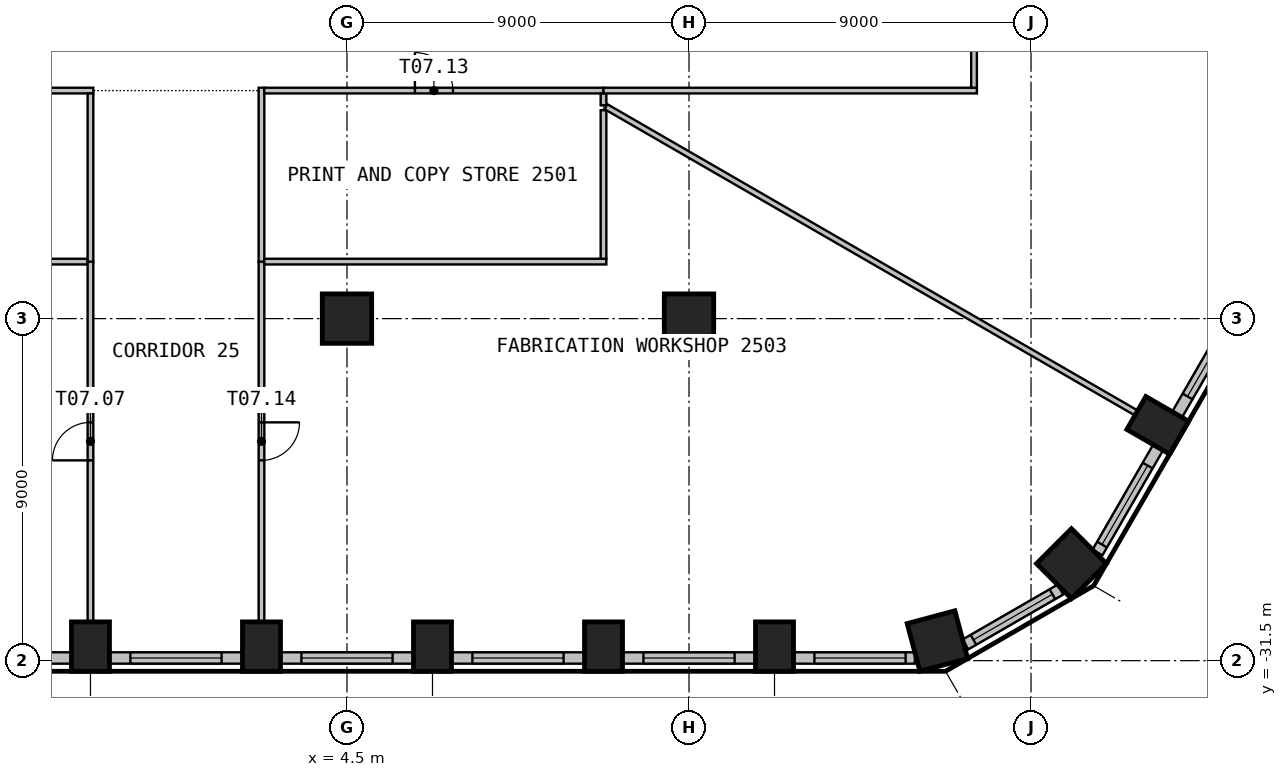
"""IFC4 building model, lengths in metres.
Left out: names, types, materials, properties, quantities, classifications, styles, units other than length and angle.
Written with IfcOpenShell. Run it as: python <this file> out.ifc"""

import sys

from ifc_helpers import new_model, si_unit, direction, frame, frame_2d, origin, origin_2d, place, context, subcontext, project, spatial, rectangle, circle, extrude, element, fill, save


model = new_model("IFC4")
c1 = context("Model", 3, precision=1e-05, world=origin(), true_north=direction((0.0, 1.0)))
c2 = subcontext(c1, "Body", "Model", "MODEL_VIEW")
j1 = project(units=[si_unit("LENGTHUNIT", "METRE"), si_unit("PLANEANGLEUNIT", "RADIAN")], contexts=[c1])
p1 = place(None, origin())
s1 = spatial("IfcSite", under=j1, at=p1, CompositionType="ELEMENT")
p2 = place(p1, origin())
s2 = spatial("IfcBuilding", under=s1, at=p2, CompositionType="ELEMENT")
p3 = place(p2, frame((0.0, 0.0, 104.7)))
s3 = spatial("IfcBuildingStorey", under=s2, at=p3, CompositionType="ELEMENT", Elevation=104.7)
for number, where, z_axis, x_axis in (
    (1, (-2.25, -31.13, 0.0), (0.0, 0.0, 1.0), (1.0, 0.0, 0.0)),
    (2, (2.25, -31.13, 0.0), (0.0, 0.0, 1.0), (1.0, 0.0, 0.0)),
    (3, (6.75, -31.13, 0.0), (0.0, 0.0, 1.0), (1.0, 0.0, 0.0)),
    (4, (11.25, -31.13, 0.0), (0.0, 0.0, 1.0), (1.0, 0.0, 0.0)),
    (5, (15.75, -31.13, 0.0), (0.0, 0.0, 1.0), (1.0, 0.0, 0.0)),
):
    element("IfcColumn", number, at=place(p3, frame(where, z_axis=z_axis, x_axis=x_axis)), inside=s3, PredefinedType="COLUMN", context=c2, shape_type="SweptSolid", body=[
        extrude(rectangle(XDim=1.0, YDim=1.3, at=origin_2d()), origin(), (0.0, 0.0, 1.0), 3.525),
    ])
for number, where, z_axis, x_axis in (
    (6, (20.037, -30.984, 0.0), (0.0, 0.0, 1.0), (0.966, 0.259, 0.0)),
    (7, (23.564, -28.947, 0.0), (0.0, 0.0, 1.0), (0.707, 0.707, 0.0)),
):
    element("IfcColumn", number, at=place(p3, frame(where, z_axis=z_axis, x_axis=x_axis)), inside=s3, PredefinedType="COLUMN", context=c2, shape_type="SweptSolid", body=[
        extrude(rectangle(XDim=1.3, YDim=1.3, at=origin_2d()), origin(), (0.0, 0.0, 1.0), 3.525),
    ])
p4 = place(p3, frame((25.834, -25.308, 0.0), z_axis=(0.0, 0.0, 1.0), x_axis=(0.5, 0.866025403784, 0.0)))
e8 = element("IfcColumn", 8, at=p4, inside=s3, PredefinedType="COLUMN", context=c2, shape_type="SweptSolid", body=[
    extrude(rectangle(XDim=1.0, YDim=1.3, at=origin_2d()), origin(), (0.0, 0.0, 1.0), 3.525),
])
for number, where, z_axis, x_axis in (
    (9, (4.5, -22.5, 0.0), (0.0, 0.0, 1.0), (1.0, 0.0, 0.0)),
    (10, (13.5, -22.5, 0.0), (0.0, 0.0, 1.0), (1.0, 0.0, 0.0)),
):
    element("IfcColumn", number, at=place(p3, frame(where, z_axis=z_axis, x_axis=x_axis)), inside=s3, PredefinedType="COLUMN", context=c2, shape_type="SweptSolid", body=[
        extrude(circle(Radius=0.65, at=origin_2d()), origin(), (0.0, 0.0, 1.0), 3.525),
    ])
p5 = place(p3, frame((-6.25, -31.43, 0.0), z_axis=(0.0, 0.0, 1.0), x_axis=(1.0, 0.0, 0.0)))
e11 = element("IfcWall", 11, at=p5, inside=s3, PredefinedType="SOLIDWALL", context=c2, shape_type="SweptSolid", body=[
    extrude(rectangle(XDim=3.499, YDim=0.3, at=frame_2d((1.75, 0.0))), origin(), (0.0, 0.0, 1.0), 3.525),
])
p6 = place(p5, frame((0.55, 0.0, 0.9)))
e12 = element("IfcOpeningElement", 12, at=p6, cuts=e11, PredefinedType="OPENING", context=c2, shape_type="SweptSolid", body=[
    extrude(rectangle(XDim=2.4, YDim=2.1, at=frame_2d((1.2, 1.05))), frame((0.0, 0.16, 0.0), z_axis=(0.0, -1.0, 0.0), x_axis=(1.0, 0.0, 0.0)), (0.0, 0.0, 1.0), 0.32),
])
p7 = place(p3, frame((-1.75, -31.43, 0.0), z_axis=(0.0, 0.0, 1.0), x_axis=(1.0, 0.0, 0.0)))
e13 = element("IfcWall", 13, at=p7, inside=s3, PredefinedType="SOLIDWALL", context=c2, shape_type="SweptSolid", body=[
    extrude(rectangle(XDim=3.499, YDim=0.3, at=frame_2d((1.75, 0.0))), origin(), (0.0, 0.0, 1.0), 3.525),
])
p8 = place(p7, frame((0.55, 0.0, 0.9)))
e14 = element("IfcOpeningElement", 14, at=p8, cuts=e13, PredefinedType="OPENING", context=c2, shape_type="SweptSolid", body=[
    extrude(rectangle(XDim=2.4, YDim=2.1, at=frame_2d((1.2, 1.05))), frame((0.0, 0.16, 0.0), z_axis=(0.0, -1.0, 0.0), x_axis=(1.0, 0.0, 0.0)), (0.0, 0.0, 1.0), 0.32),
])
p9 = place(p3, frame((2.75, -31.43, 0.0), z_axis=(0.0, 0.0, 1.0), x_axis=(1.0, 0.0, 0.0)))
e15 = element("IfcWall", 15, at=p9, inside=s3, PredefinedType="SOLIDWALL", context=c2, shape_type="SweptSolid", body=[
    extrude(rectangle(XDim=3.499, YDim=0.3, at=frame_2d((1.75, 0.0))), origin(), (0.0, 0.0, 1.0), 3.525),
])
p10 = place(p9, frame((0.55, 0.0, 0.9)))
e16 = element("IfcOpeningElement", 16, at=p10, cuts=e15, PredefinedType="OPENING", context=c2, shape_type="SweptSolid", body=[
    extrude(rectangle(XDim=2.4, YDim=2.1, at=frame_2d((1.2, 1.05))), frame((0.0, 0.16, 0.0), z_axis=(0.0, -1.0, 0.0), x_axis=(1.0, 0.0, 0.0)), (0.0, 0.0, 1.0), 0.32),
])
p11 = place(p3, frame((7.25, -31.43, 0.0), z_axis=(0.0, 0.0, 1.0), x_axis=(1.0, 0.0, 0.0)))
e17 = element("IfcWall", 17, at=p11, inside=s3, PredefinedType="SOLIDWALL", context=c2, shape_type="SweptSolid", body=[
    extrude(rectangle(XDim=3.499, YDim=0.3, at=frame_2d((1.75, 0.0))), origin(), (0.0, 0.0, 1.0), 3.525),
])
p12 = place(p11, frame((0.55, 0.0, 0.9)))
e18 = element("IfcOpeningElement", 18, at=p12, cuts=e17, PredefinedType="OPENING", context=c2, shape_type="SweptSolid", body=[
    extrude(rectangle(XDim=2.4, YDim=2.1, at=frame_2d((1.2, 1.05))), frame((0.0, 0.16, 0.0), z_axis=(0.0, -1.0, 0.0), x_axis=(1.0, 0.0, 0.0)), (0.0, 0.0, 1.0), 0.32),
])
p13 = place(p3, frame((11.75, -31.43, 0.0), z_axis=(0.0, 0.0, 1.0), x_axis=(1.0, 0.0, 0.0)))
e19 = element("IfcWall", 19, at=p13, inside=s3, PredefinedType="SOLIDWALL", context=c2, shape_type="SweptSolid", body=[
    extrude(rectangle(XDim=3.499, YDim=0.3, at=frame_2d((1.75, 0.0))), origin(), (0.0, 0.0, 1.0), 3.525),
])
p14 = place(p13, frame((0.55, 0.0, 0.9)))
e20 = element("IfcOpeningElement", 20, at=p14, cuts=e19, PredefinedType="OPENING", context=c2, shape_type="SweptSolid", body=[
    extrude(rectangle(XDim=2.4, YDim=2.1, at=frame_2d((1.2, 1.05))), frame((0.0, 0.16, 0.0), z_axis=(0.0, -1.0, 0.0), x_axis=(1.0, 0.0, 0.0)), (0.0, 0.0, 1.0), 0.32),
])
p15 = place(p3, frame((16.25, -31.43, 0.0), z_axis=(0.0, 0.0, 1.0), x_axis=(1.0, 0.0, 0.0)))
e21 = element("IfcWall", 21, at=p15, inside=s3, PredefinedType="SOLIDWALL", context=c2, shape_type="SweptSolid", body=[
    extrude(rectangle(XDim=3.192, YDim=0.3, at=frame_2d((1.596, 0.0))), origin(), (0.0, 0.0, 1.0), 3.525),
])
p16 = place(p15, frame((0.55, 0.0, 0.9)))
e22 = element("IfcOpeningElement", 22, at=p16, cuts=e21, PredefinedType="OPENING", context=c2, shape_type="SweptSolid", body=[
    extrude(rectangle(XDim=2.4, YDim=2.1, at=frame_2d((1.2, 1.05))), frame((0.0, 0.16, 0.0), z_axis=(0.0, -1.0, 0.0), x_axis=(1.0, 0.0, 0.0)), (0.0, 0.0, 1.0), 0.32),
])
p17 = place(p3, frame((20.774, -31.073, 0.0), z_axis=(0.0, 0.0, 1.0), x_axis=(0.866053149362, 0.49995194017, 0.0)))
e23 = element("IfcWall", 23, at=p17, inside=s3, PredefinedType="SOLIDWALL", context=c2, shape_type="SweptSolid", body=[
    extrude(rectangle(XDim=2.885, YDim=0.3, at=frame_2d((1.443, 0.0))), origin(), (0.0, 0.0, 1.0), 3.525),
])
p18 = place(p17, frame((0.243, 0.0, 0.9)))
e24 = element("IfcOpeningElement", 24, at=p18, cuts=e23, PredefinedType="OPENING", context=c2, shape_type="SweptSolid", body=[
    extrude(rectangle(XDim=2.4, YDim=2.1, at=frame_2d((1.2, 1.05))), frame((0.0, 0.16, 0.0), z_axis=(0.0, -1.0, 0.0), x_axis=(1.0, 0.0, 0.0)), (0.0, 0.0, 1.0), 0.32),
])
p19 = place(p3, frame((24.248, -28.656, 0.0), z_axis=(0.0, 0.0, 1.0), x_axis=(0.500004907028, 0.866022570692, 0.0)))
e25 = element("IfcWall", 25, at=p19, inside=s3, PredefinedType="SOLIDWALL", context=c2, shape_type="SweptSolid", body=[
    extrude(rectangle(XDim=3.192, YDim=0.3, at=frame_2d((1.596, 0.0))), origin(), (0.0, 0.0, 1.0), 3.525),
])
p20 = place(p19, frame((0.243, 0.0, 0.9)))
e26 = element("IfcOpeningElement", 26, at=p20, cuts=e25, PredefinedType="OPENING", context=c2, shape_type="SweptSolid", body=[
    extrude(rectangle(XDim=2.4, YDim=2.1, at=frame_2d((1.2, 1.05))), frame((0.0, 0.16, 0.0), z_axis=(0.0, -1.0, 0.0), x_axis=(1.0, 0.0, 0.0)), (0.0, 0.0, 1.0), 0.32),
])
p21 = place(p3, frame((26.344, -25.024, 0.0), z_axis=(0.0, 0.0, 1.0), x_axis=(0.499996256241, 0.866027565234, 0.0)))
e27 = element("IfcWall", 27, at=p21, inside=s3, PredefinedType="SOLIDWALL", context=c2, shape_type="SweptSolid", body=[
    extrude(rectangle(XDim=3.499, YDim=0.3, at=frame_2d((1.75, 0.0))), origin(), (0.0, 0.0, 1.0), 3.525),
])
p22 = place(p21, frame((0.55, 0.0, 0.9)))
e28 = element("IfcOpeningElement", 28, at=p22, cuts=e27, PredefinedType="OPENING", context=c2, shape_type="SweptSolid", body=[
    extrude(rectangle(XDim=2.4, YDim=2.1, at=frame_2d((1.2, 1.05))), frame((0.0, 0.16, 0.0), z_axis=(0.0, -1.0, 0.0), x_axis=(1.0, 0.0, 0.0)), (0.0, 0.0, 1.0), 0.32),
])
p23 = place(p3, frame((-11.175, -21.0, 0.0), z_axis=(0.0, 0.0, 1.0), x_axis=(1.0, 0.0, 0.0)))
e29 = element("IfcWall", 29, at=p23, inside=s3, PredefinedType="PARTITIONING", context=c2, shape_type="SweptSolid", body=[
    extrude(rectangle(XDim=8.85, YDim=0.15, at=frame_2d((4.425, 0.0))), origin(), (0.0, 0.0, 1.0), 3.525),
])
p24 = place(p3, frame((-11.25, -16.5, 0.0), z_axis=(0.0, 0.0, 1.0), x_axis=(1.0, 0.0, 0.0)))
e30 = element("IfcWall", 30, at=p24, inside=s3, PredefinedType="PARTITIONING", context=c2, shape_type="SweptSolid", body=[
    extrude(rectangle(XDim=9.075, YDim=0.15, at=frame_2d((4.538, 0.0))), origin(), (0.0, 0.0, 1.0), 3.525),
])
p25 = place(p24, frame((4.038, 0.0, 0.0)))
e31 = element("IfcOpeningElement", 31, at=p25, cuts=e30, PredefinedType="OPENING", context=c2, shape_type="SweptSolid", body=[
    extrude(rectangle(XDim=1.0, YDim=2.1, at=frame_2d((0.5, 1.05))), frame((0.0, 0.085, 0.0), z_axis=(0.0, -1.0, 0.0), x_axis=(1.0, 0.0, 0.0)), (0.0, 0.0, 1.0), 0.17),
])
p26 = place(p3, frame((-2.25, -30.46, 0.0), z_axis=(0.0, 0.0, 1.0), x_axis=(0.0, 1.0, 0.0)))
e32 = element("IfcWall", 32, at=p26, inside=s3, PredefinedType="PARTITIONING", context=c2, shape_type="SweptSolid", body=[
    extrude(rectangle(XDim=9.46, YDim=0.15, at=frame_2d((4.73, 0.0))), origin(), (0.0, 0.0, 1.0), 3.525),
])
p27 = place(p26, frame((4.23, 0.0, 0.0)))
e33 = element("IfcOpeningElement", 33, at=p27, cuts=e32, PredefinedType="OPENING", context=c2, shape_type="SweptSolid", body=[
    extrude(rectangle(XDim=1.0, YDim=2.1, at=frame_2d((0.5, 1.05))), frame((0.0, 0.085, 0.0), z_axis=(0.0, -1.0, 0.0), x_axis=(1.0, 0.0, 0.0)), (0.0, 0.0, 1.0), 0.17),
])
p28 = place(p3, frame((-2.25, -21.0, 0.0), z_axis=(0.0, 0.0, 1.0), x_axis=(0.0, 1.0, 0.0)))
e34 = element("IfcWall", 34, at=p28, inside=s3, PredefinedType="PARTITIONING", context=c2, shape_type="SweptSolid", body=[
    extrude(rectangle(XDim=4.425, YDim=0.15, at=frame_2d((2.212, 0.0))), origin(), (0.0, 0.0, 1.0), 3.525),
])
p29 = place(p3, frame((2.25, -21.0, 0.0), z_axis=(0.0, 0.0, 1.0), x_axis=(0.0, -1.0, 0.0)))
e35 = element("IfcWall", 35, at=p29, inside=s3, PredefinedType="PARTITIONING", context=c2, shape_type="SweptSolid", body=[
    extrude(rectangle(XDim=9.46, YDim=0.15, at=frame_2d((4.73, 0.0))), origin(), (0.0, 0.0, 1.0), 3.525),
])
p30 = place(p29, frame((4.23, 0.0, 0.0)))
e36 = element("IfcOpeningElement", 36, at=p30, cuts=e35, PredefinedType="OPENING", context=c2, shape_type="SweptSolid", body=[
    extrude(rectangle(XDim=1.0, YDim=2.1, at=frame_2d((0.5, 1.05))), frame((0.0, 0.085, 0.0), z_axis=(0.0, -1.0, 0.0), x_axis=(1.0, 0.0, 0.0)), (0.0, 0.0, 1.0), 0.17),
])
p31 = place(p3, frame((2.25, -16.425, 0.0), z_axis=(0.0, 0.0, 1.0), x_axis=(0.0, -1.0, 0.0)))
e37 = element("IfcWall", 37, at=p31, inside=s3, PredefinedType="PARTITIONING", context=c2, shape_type="SweptSolid", body=[
    extrude(rectangle(XDim=4.575, YDim=0.15, at=frame_2d((2.288, 0.0))), origin(), (0.0, 0.0, 1.0), 3.525),
])
p32 = place(p3, frame((11.325, -21.0, 0.0), z_axis=(0.0, 0.0, 1.0), x_axis=(-1.0, 0.0, 0.0)))
e38 = element("IfcWall", 38, at=p32, inside=s3, PredefinedType="PARTITIONING", context=c2, shape_type="SweptSolid", body=[
    extrude(rectangle(XDim=9.0, YDim=0.15, at=frame_2d((4.5, 0.0))), origin(), (0.0, 0.0, 1.0), 3.525),
])
p33 = place(p3, frame((2.325, -16.5, 0.0), z_axis=(0.0, 0.0, 1.0), x_axis=(1.0, 0.0, 0.0)))
e39 = element("IfcWall", 39, at=p33, inside=s3, PredefinedType="PARTITIONING", context=c2, shape_type="SweptSolid", body=[
    extrude(rectangle(XDim=8.925, YDim=0.15, at=frame_2d((4.462, 0.0))), origin(), (0.0, 0.0, 1.0), 3.525),
])
p34 = place(p33, frame((3.962, 0.0, 0.0)))
e40 = element("IfcOpeningElement", 40, at=p34, cuts=e39, PredefinedType="OPENING", context=c2, shape_type="SweptSolid", body=[
    extrude(rectangle(XDim=1.0, YDim=2.1, at=frame_2d((0.5, 1.05))), frame((0.0, 0.085, 0.0), z_axis=(0.0, -1.0, 0.0), x_axis=(1.0, 0.0, 0.0)), (0.0, 0.0, 1.0), 0.17),
])
p35 = place(p3, frame((11.25, -17.017, 0.0), z_axis=(0.0, 0.0, 1.0), x_axis=(0.0, -1.0, 0.0)))
e41 = element("IfcWall", 41, at=p35, inside=s3, PredefinedType="PARTITIONING", context=c2, shape_type="SweptSolid", body=[
    extrude(rectangle(XDim=3.908, YDim=0.15, at=frame_2d((1.954, 0.0))), origin(), (0.0, 0.0, 1.0), 3.525),
])
p36 = place(p3, frame((11.25, -16.575, 0.0), z_axis=(0.0, 0.0, 1.0), x_axis=(0.0, -1.0, 0.0)))
e42 = element("IfcWall", 42, at=p36, inside=s3, PredefinedType="PARTITIONING", context=c2, shape_type="SweptSolid", body=[
    extrude(rectangle(XDim=0.312, YDim=0.15, at=frame_2d((0.156, 0.0))), origin(), (0.0, 0.0, 1.0), 3.525),
])
p37 = place(p3, frame((11.315, -16.925, 0.0), z_axis=(0.0, 0.0, 1.0), x_axis=(0.86600725109, -0.500031440071, 0.0)))
e43 = element("IfcWall", 43, at=p37, inside=s3, PredefinedType="PARTITIONING", context=c2, shape_type="SweptSolid", body=[
    extrude(rectangle(XDim=16.096, YDim=0.15, at=frame_2d((8.048, 0.0))), origin(), (0.0, 0.0, 1.0), 3.525),
])
p38 = place(p3, frame((11.25, -16.5, 0.0), z_axis=(0.0, 0.0, 1.0), x_axis=(1.0, 0.0, 0.0)))
e44 = element("IfcWall", 44, at=p38, inside=s3, PredefinedType="PARTITIONING", context=c2, shape_type="SweptSolid", body=[
    extrude(rectangle(XDim=9.825, YDim=0.15, at=frame_2d((4.913, 0.0))), origin(), (0.0, 0.0, 1.0), 3.525),
])
p39 = place(p3, frame((21.0, -16.425, 0.0), z_axis=(0.0, 0.0, 1.0), x_axis=(0.0, 1.0, 0.0)))
e45 = element("IfcWall", 45, at=p39, inside=s3, PredefinedType="PARTITIONING", context=c2, shape_type="SweptSolid", body=[
    extrude(rectangle(XDim=14.25, YDim=0.15, at=frame_2d((7.125, 0.0))), origin(), (0.0, 0.0, 1.0), 3.525),
])
p40 = place(p39, frame((6.625, 0.0, 0.0)))
e46 = element("IfcOpeningElement", 46, at=p40, cuts=e45, PredefinedType="OPENING", context=c2, shape_type="SweptSolid", body=[
    extrude(rectangle(XDim=1.0, YDim=2.1, at=frame_2d((0.5, 1.05))), frame((0.0, 0.085, 0.0), z_axis=(0.0, -1.0, 0.0), x_axis=(1.0, 0.0, 0.0)), (0.0, 0.0, 1.0), 0.17),
])
p41 = place(p8, origin())
e47 = element("IfcWindow", 47, at=p41, inside=s3, PartitioningType="SINGLE_PANEL", PredefinedType="WINDOW", context=c2, shape_type="SweptSolid", body=[
    extrude(rectangle(XDim=2.4, YDim=2.1, at=frame_2d((1.2, 1.05))), frame((0.0, 0.03, 0.0), z_axis=(0.0, -1.0, 0.0), x_axis=(1.0, 0.0, 0.0)), (0.0, 0.0, 1.0), 0.06),
])
fill(e14, e47)
p42 = place(p10, origin())
e48 = element("IfcWindow", 48, at=p42, inside=s3, PartitioningType="SINGLE_PANEL", PredefinedType="WINDOW", context=c2, shape_type="SweptSolid", body=[
    extrude(rectangle(XDim=2.4, YDim=2.1, at=frame_2d((1.2, 1.05))), frame((0.0, 0.03, 0.0), z_axis=(0.0, -1.0, 0.0), x_axis=(1.0, 0.0, 0.0)), (0.0, 0.0, 1.0), 0.06),
])
fill(e16, e48)
p43 = place(p12, origin())
e49 = element("IfcWindow", 49, at=p43, inside=s3, PartitioningType="SINGLE_PANEL", PredefinedType="WINDOW", context=c2, shape_type="SweptSolid", body=[
    extrude(rectangle(XDim=2.4, YDim=2.1, at=frame_2d((1.2, 1.05))), frame((0.0, 0.03, 0.0), z_axis=(0.0, -1.0, 0.0), x_axis=(1.0, 0.0, 0.0)), (0.0, 0.0, 1.0), 0.06),
])
fill(e18, e49)
p44 = place(p14, origin())
e50 = element("IfcWindow", 50, at=p44, inside=s3, PartitioningType="SINGLE_PANEL", PredefinedType="WINDOW", context=c2, shape_type="SweptSolid", body=[
    extrude(rectangle(XDim=2.4, YDim=2.1, at=frame_2d((1.2, 1.05))), frame((0.0, 0.03, 0.0), z_axis=(0.0, -1.0, 0.0), x_axis=(1.0, 0.0, 0.0)), (0.0, 0.0, 1.0), 0.06),
])
fill(e20, e50)
p45 = place(p16, origin())
e51 = element("IfcWindow", 51, at=p45, inside=s3, PartitioningType="SINGLE_PANEL", PredefinedType="WINDOW", context=c2, shape_type="SweptSolid", body=[
    extrude(rectangle(XDim=2.4, YDim=2.1, at=frame_2d((1.2, 1.05))), frame((0.0, 0.03, 0.0), z_axis=(0.0, -1.0, 0.0), x_axis=(1.0, 0.0, 0.0)), (0.0, 0.0, 1.0), 0.06),
])
fill(e22, e51)
p46 = place(p18, origin())
e52 = element("IfcWindow", 52, at=p46, inside=s3, PartitioningType="SINGLE_PANEL", PredefinedType="WINDOW", context=c2, shape_type="SweptSolid", body=[
    extrude(rectangle(XDim=2.4, YDim=2.1, at=frame_2d((1.2, 1.05))), frame((0.0, 0.03, 0.0), z_axis=(0.0, -1.0, 0.0), x_axis=(1.0, 0.0, 0.0)), (0.0, 0.0, 1.0), 0.06),
])
fill(e24, e52)
p47 = place(p20, origin())
e53 = element("IfcWindow", 53, at=p47, inside=s3, PartitioningType="SINGLE_PANEL", PredefinedType="WINDOW", context=c2, shape_type="SweptSolid", body=[
    extrude(rectangle(XDim=2.4, YDim=2.1, at=frame_2d((1.2, 1.05))), frame((0.0, 0.03, 0.0), z_axis=(0.0, -1.0, 0.0), x_axis=(1.0, 0.0, 0.0)), (0.0, 0.0, 1.0), 0.06),
])
fill(e26, e53)
p48 = place(p22, origin())
e54 = element("IfcWindow", 54, at=p48, inside=s3, PartitioningType="SINGLE_PANEL", PredefinedType="WINDOW", context=c2, shape_type="SweptSolid", body=[
    extrude(rectangle(XDim=2.4, YDim=2.1, at=frame_2d((1.2, 1.05))), frame((0.0, 0.03, 0.0), z_axis=(0.0, -1.0, 0.0), x_axis=(1.0, 0.0, 0.0)), (0.0, 0.0, 1.0), 0.06),
])
fill(e28, e54)
p49 = place(p27, origin())
e55 = element("IfcDoor", 55, at=p49, inside=s3, OperationType="SINGLE_SWING_LEFT", PredefinedType="DOOR", context=c2, shape_type="SweptSolid", body=[
    extrude(rectangle(XDim=1.0, YDim=2.1, at=frame_2d((0.5, 1.05))), frame((0.0, 0.025, 0.0), z_axis=(0.0, -1.0, 0.0), x_axis=(1.0, 0.0, 0.0)), (0.0, 0.0, 1.0), 0.05),
])
fill(e33, e55)
p50 = place(p34, origin())
e56 = element("IfcDoor", 56, at=p50, inside=s3, OperationType="SINGLE_SWING_RIGHT", PredefinedType="DOOR", context=c2, shape_type="SweptSolid", body=[
    extrude(rectangle(XDim=1.0, YDim=2.1, at=frame_2d((0.5, 1.05))), frame((0.0, 0.025, 0.0), z_axis=(0.0, -1.0, 0.0), x_axis=(1.0, 0.0, 0.0)), (0.0, 0.0, 1.0), 0.05),
])
fill(e40, e56)
p51 = place(p30, origin())
e57 = element("IfcDoor", 57, at=p51, inside=s3, OperationType="SINGLE_SWING_LEFT", PredefinedType="DOOR", context=c2, shape_type="SweptSolid", body=[
    extrude(rectangle(XDim=1.0, YDim=2.1, at=frame_2d((0.5, 1.05))), frame((0.0, 0.025, 0.0), z_axis=(0.0, -1.0, 0.0), x_axis=(1.0, 0.0, 0.0)), (0.0, 0.0, 1.0), 0.05),
])
fill(e36, e57)
save(model, sys.argv[1])
